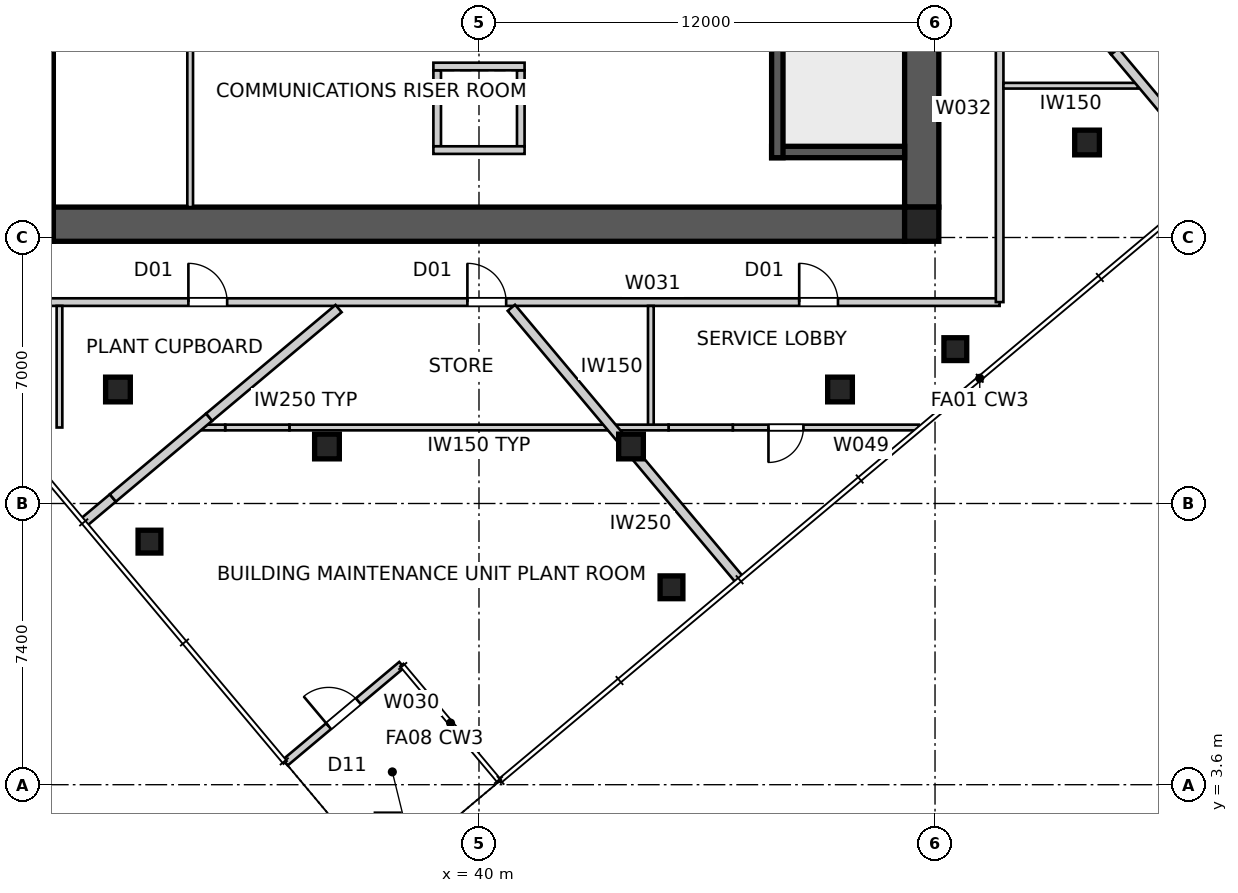
"""IFC4 building model, lengths in metres.
Left out: names, types, materials, properties, quantities, classifications, styles, units other than length and angle.
Written with IfcOpenShell. Run it as: python <this file> out.ifc"""

import sys

from ifc_helpers import new_model, si_unit, direction, frame, frame_2d, origin, origin_2d, place, context, subcontext, project, spatial, polyline, rectangle, outline, extrude, element, fill, save


model = new_model("IFC4")
c1 = context("Model", 3, precision=1e-05, world=origin(), true_north=direction((0.0, 1.0)))
c2 = subcontext(c1, "Body", "Model", "MODEL_VIEW")
j1 = project(units=[si_unit("LENGTHUNIT", "METRE"), si_unit("PLANEANGLEUNIT", "RADIAN")], contexts=[c1])
p1 = place(None, origin())
s1 = spatial("IfcSite", under=j1, at=p1, CompositionType="ELEMENT")
p2 = place(p1, origin())
s2 = spatial("IfcBuilding", under=s1, at=p2, CompositionType="ELEMENT")
p3 = place(p2, frame((0.0, 0.0, 304.3)))
s3 = spatial("IfcBuildingStorey", under=s2, at=p3, CompositionType="ELEMENT", Elevation=304.3)
p4 = place(p3, frame((51.2, 18.35, 0.0), z_axis=(0.0, 0.0, 1.0), x_axis=(-1.0, 0.0, 0.0)))
e1 = element("IfcWall", 1, at=p4, inside=s3, PredefinedType="SHEAR", context=c2, shape_type="SweptSolid", body=[
    extrude(outline(polyline([(0.0, -0.45), (22.4, -0.45), (22.4, -0.025), (22.85, -0.025), (22.85, 0.025), (22.4, 0.025), (22.4, 0.45), (0.0, 0.45), (0.0, 0.025), (-0.45, 0.025), (-0.45, -0.025), (0.0, -0.025), (0.0, -0.45)])), origin(), (0.0, 0.0, 1.0), 4.5),
])
p5 = place(p3, frame((51.65, 18.8, 0.0), z_axis=(0.0, 0.0, 1.0), x_axis=(0.0, 1.0, 0.0)))
e2 = element("IfcWall", 2, at=p5, inside=s3, PredefinedType="SHEAR", context=c2, shape_type="SweptSolid", body=[
    extrude(outline(polyline([(0.0, -0.45), (22.4, -0.45), (22.4, -0.025), (22.85, -0.025), (22.85, 0.025), (22.4, 0.025), (22.4, 0.45), (0.0, 0.45), (0.0, 0.025), (-0.45, 0.025), (-0.45, -0.025), (0.0, -0.025), (0.0, -0.45)])), origin(), (0.0, 0.0, 1.0), 4.5),
])
p6 = place(p5, frame((11.14, 0.0, 0.0)))
e3 = element("IfcOpeningElement", 3, at=p6, cuts=e2, PredefinedType="OPENING", context=c2, shape_type="SweptSolid", body=[
    extrude(rectangle(XDim=1.02, YDim=2.4, at=frame_2d((0.51, 1.2))), frame((0.0, 0.46, 0.0), z_axis=(0.0, -1.0, 0.0), x_axis=(1.0, 0.0, 0.0)), (0.0, 0.0, 1.0), 0.92),
])
p7 = place(p3, frame((28.35, 41.2, 0.0), z_axis=(0.0, 0.0, 1.0), x_axis=(0.0, -1.0, 0.0)))
e4 = element("IfcWall", 4, at=p7, inside=s3, PredefinedType="SHEAR", context=c2, shape_type="SweptSolid", body=[
    extrude(outline(polyline([(0.0, -0.45), (22.4, -0.45), (22.4, -0.025), (22.85, -0.025), (22.85, 0.025), (22.4, 0.025), (22.4, 0.45), (0.0, 0.45), (0.0, 0.025), (-0.45, 0.025), (-0.45, -0.025), (0.0, -0.025), (0.0, -0.45)])), origin(), (0.0, 0.0, 1.0), 4.5),
])
p8 = place(p7, frame((11.14, 0.0, 0.0)))
e5 = element("IfcOpeningElement", 5, at=p8, cuts=e4, PredefinedType="OPENING", context=c2, shape_type="SweptSolid", body=[
    extrude(rectangle(XDim=1.02, YDim=2.4, at=frame_2d((0.51, 1.2))), frame((0.0, 0.46, 0.0), z_axis=(0.0, -1.0, 0.0), x_axis=(1.0, 0.0, 0.0)), (0.0, 0.0, 1.0), 0.92),
])
p9 = place(p3, frame((47.85, 27.8, 0.0), z_axis=(0.0, 0.0, 1.0), x_axis=(0.0, -1.0, 0.0)))
e6 = element("IfcWall", 6, at=p9, inside=s3, PredefinedType="SHEAR", context=c2, shape_type="SweptSolid", body=[
    extrude(rectangle(XDim=7.7, YDim=0.3, at=frame_2d((3.85, 0.0))), origin(), (0.0, 0.0, 1.0), 4.5),
])
p10 = place(p3, frame((51.2, 20.25, 0.0), z_axis=(0.0, 0.0, 1.0), x_axis=(-1.0, 0.0, 0.0)))
e7 = element("IfcWall", 7, at=p10, inside=s3, PredefinedType="SHEAR", context=c2, shape_type="SweptSolid", body=[
    extrude(rectangle(XDim=3.5, YDim=0.3, at=frame_2d((1.75, 0.0))), origin(), (0.0, 0.0, 1.0), 4.5),
])
for number, where, z_axis, x_axis in (
    (8, (38.9, 22.4, 0.0), (0.0, 0.0, 1.0), (0.0, -1.0, 0.0)),
    (9, (41.1, 22.4, 0.0), (0.0, 0.0, 1.0), (0.0, -1.0, 0.0)),
):
    element("IfcWall", number, at=place(p3, frame(where, z_axis=z_axis, x_axis=x_axis)), inside=s3, PredefinedType="SOLIDWALL", context=c2, shape_type="SweptSolid", body=[
        extrude(rectangle(XDim=2.0, YDim=0.2, at=frame_2d((1.0, 0.0))), origin(), (0.0, 0.0, 1.0), 4.5),
    ])
for number, where, z_axis, x_axis in (
    (10, (38.8, 22.5, 0.0), (0.0, 0.0, 1.0), (1.0, 0.0, 0.0)),
    (11, (38.8, 20.3, 0.0), (0.0, 0.0, 1.0), (1.0, 0.0, 0.0)),
):
    element("IfcWall", number, at=place(p3, frame(where, z_axis=z_axis, x_axis=x_axis)), inside=s3, PredefinedType="SOLIDWALL", context=c2, shape_type="SweptSolid", body=[
        extrude(rectangle(XDim=2.4, YDim=0.2, at=frame_2d((1.2, 0.0))), origin(), (0.0, 0.0, 1.0), 4.5),
    ])
for number, where, z_axis, x_axis in (
    (12, (28.35, 18.35, 0.0), (0.0, 0.0, 1.0), (1.0, 0.0, 0.0)),
    (13, (51.65, 18.35, 0.0), (0.0, 0.0, 1.0), (1.0, 0.0, 0.0)),
):
    element("IfcColumn", number, at=place(p3, frame(where, z_axis=z_axis, x_axis=x_axis)), inside=s3, PredefinedType="COLUMN", context=c2, shape_type="SweptSolid", body=[
        extrude(rectangle(XDim=0.9, YDim=0.9, at=origin_2d()), origin(), (0.0, 0.0, 1.0), 4.5),
    ])
for number, where, z_axis, x_axis in (
    (14, (45.065, 8.795, 0.0), (0.0, 0.0, 1.0), (1.0, 0.0, 0.0)),
    (15, (52.534, 15.062, 0.0), (0.0, 0.0, 1.0), (1.0, 0.0, 0.0)),
    (16, (31.329, 9.997, 0.0), (0.0, 0.0, 1.0), (1.0, 0.0, 0.0)),
):
    element("IfcColumn", number, at=place(p3, frame(where, z_axis=z_axis, x_axis=x_axis)), inside=s3, PredefinedType="COLUMN", context=c2, shape_type="SweptSolid", body=[
        extrude(rectangle(XDim=0.6, YDim=0.6, at=origin_2d()), origin(), (0.0, 0.0, 1.0), 4.5),
    ])
for number, where, z_axis, x_axis in (
    (17, (30.5, 14.0, 0.0), (0.0, 0.0, 1.0), (1.0, 0.0, 0.0)),
    (18, (36.0, 12.5, 0.0), (0.0, 0.0, 1.0), (1.0, 0.0, 0.0)),
    (19, (44.0, 12.5, 0.0), (0.0, 0.0, 1.0), (1.0, 0.0, 0.0)),
    (20, (49.5, 14.0, 0.0), (0.0, 0.0, 1.0), (1.0, 0.0, 0.0)),
    (21, (56.0, 20.5, 0.0), (0.0, 0.0, 1.0), (1.0, 0.0, 0.0)),
):
    element("IfcColumn", number, at=place(p3, frame(where, z_axis=z_axis, x_axis=x_axis)), inside=s3, PredefinedType="COLUMN", context=c2, shape_type="SweptSolid", body=[
        extrude(rectangle(XDim=0.65, YDim=0.65, at=origin_2d()), origin(), (0.0, 0.0, 1.0), 4.5),
    ])
p11 = place(p3, frame((34.902, 4.183, 0.0), z_axis=(0.0, 0.0, 1.0), x_axis=(0.766060656284, 0.642768287094, 0.0)))
e22 = element("IfcWall", 22, at=p11, inside=s3, PredefinedType="SOLIDWALL", context=c2, shape_type="SweptSolid", body=[
    extrude(rectangle(XDim=4.0, YDim=0.2, at=frame_2d((2.0, 0.0))), origin(), (0.0, 0.0, 1.0), 4.25),
])
p12 = place(p11, frame((1.49, 0.0, 0.0)))
e23 = element("IfcOpeningElement", 23, at=p12, cuts=e22, PredefinedType="OPENING", context=c2, shape_type="SweptSolid", body=[
    extrude(rectangle(XDim=1.02, YDim=2.1, at=frame_2d((0.51, 1.05))), frame((0.0, 0.11, 0.0), z_axis=(0.0, -1.0, 0.0), x_axis=(1.0, 0.0, 0.0)), (0.0, 0.0, 1.0), 0.22),
])
p13 = place(p3, frame((26.3, 16.3, 0.0), z_axis=(0.0, 0.0, 1.0), x_axis=(1.0, 0.0, 0.0)))
e24 = element("IfcWall", 24, at=p13, inside=s3, PredefinedType="PARTITIONING", context=c2, shape_type="SweptSolid", body=[
    extrude(rectangle(XDim=27.4, YDim=0.2, at=frame_2d((13.7, 0.0))), origin(), (0.0, 0.0, 1.0), 4.25),
])
p14 = place(p13, frame((22.126, 0.0, 0.0)))
e25 = element("IfcOpeningElement", 25, at=p14, cuts=e24, PredefinedType="OPENING", context=c2, shape_type="SweptSolid", body=[
    extrude(rectangle(XDim=1.02, YDim=2.34, at=frame_2d((0.51, 1.17))), frame((0.0, 0.11, 0.0), z_axis=(0.0, -1.0, 0.0), x_axis=(1.0, 0.0, 0.0)), (0.0, 0.0, 1.0), 0.22),
])
p15 = place(p13, frame((13.395, 0.0, 0.0)))
e26 = element("IfcOpeningElement", 26, at=p15, cuts=e24, PredefinedType="OPENING", context=c2, shape_type="SweptSolid", body=[
    extrude(rectangle(XDim=1.02, YDim=2.34, at=frame_2d((0.51, 1.17))), frame((0.0, 0.11, 0.0), z_axis=(0.0, -1.0, 0.0), x_axis=(1.0, 0.0, 0.0)), (0.0, 0.0, 1.0), 0.22),
])
p16 = place(p13, frame((6.053, 0.0, 0.0)))
e27 = element("IfcOpeningElement", 27, at=p16, cuts=e24, PredefinedType="OPENING", context=c2, shape_type="SweptSolid", body=[
    extrude(rectangle(XDim=1.02, YDim=2.34, at=frame_2d((0.51, 1.17))), frame((0.0, 0.11, 0.0), z_axis=(0.0, -1.0, 0.0), x_axis=(1.0, 0.0, 0.0)), (0.0, 0.0, 1.0), 0.22),
])
p17 = place(p3, frame((53.7, 16.3, 0.0), z_axis=(0.0, 0.0, 1.0), x_axis=(0.0, 1.0, 0.0)))
e28 = element("IfcWall", 28, at=p17, inside=s3, PredefinedType="PARTITIONING", context=c2, shape_type="SweptSolid", body=[
    extrude(rectangle(XDim=27.4, YDim=0.2, at=frame_2d((13.7, 0.0))), origin(), (0.0, 0.0, 1.0), 4.25),
])
p18 = place(p17, frame((10.146, 0.0, 0.0)))
e29 = element("IfcOpeningElement", 29, at=p18, cuts=e28, PredefinedType="OPENING", context=c2, shape_type="SweptSolid", body=[
    extrude(rectangle(XDim=1.02, YDim=2.34, at=frame_2d((0.51, 1.17))), frame((0.0, 0.11, 0.0), z_axis=(0.0, -1.0, 0.0), x_axis=(1.0, 0.0, 0.0)), (0.0, 0.0, 1.0), 0.22),
])
p19 = place(p17, frame((17.042, 0.0, 0.0)))
e30 = element("IfcOpeningElement", 30, at=p19, cuts=e28, PredefinedType="OPENING", context=c2, shape_type="SweptSolid", body=[
    extrude(rectangle(XDim=1.02, YDim=2.34, at=frame_2d((0.51, 1.17))), frame((0.0, 0.11, 0.0), z_axis=(0.0, -1.0, 0.0), x_axis=(1.0, 0.0, 0.0)), (0.0, 0.0, 1.0), 0.22),
])
p20 = place(p17, frame((23.434, 0.0, 0.0)))
e31 = element("IfcOpeningElement", 31, at=p20, cuts=e28, PredefinedType="OPENING", context=c2, shape_type="SweptSolid", body=[
    extrude(rectangle(XDim=1.02, YDim=2.34, at=frame_2d((0.51, 1.17))), frame((0.0, 0.11, 0.0), z_axis=(0.0, -1.0, 0.0), x_axis=(1.0, 0.0, 0.0)), (0.0, 0.0, 1.0), 0.22),
])
p21 = place(p3, frame((46.857, 8.993, 0.0), z_axis=(0.0, 0.0, 1.0), x_axis=(-0.64278692291, 0.766045019392, 0.0)))
e32 = element("IfcWall", 32, at=p21, inside=s3, PredefinedType="PARTITIONING", context=c2, shape_type="SweptSolid", body=[
    extrude(rectangle(XDim=9.343, YDim=0.25, at=frame_2d((4.671, 0.0))), origin(), (0.0, 0.0, 1.0), 4.25),
])
p22 = place(p3, frame((58.854, 20.365, 0.0), z_axis=(0.0, 0.0, 1.0), x_axis=(-0.642823301165, 0.766014492995, 0.0)))
e33 = element("IfcWall", 33, at=p22, inside=s3, PredefinedType="PARTITIONING", context=c2, shape_type="SweptSolid", body=[
    extrude(rectangle(XDim=3.308, YDim=0.25, at=frame_2d((1.654, 0.0))), origin(), (0.0, 0.0, 1.0), 3.638),
])
p23 = place(p3, frame((56.728, 22.899, 0.0), z_axis=(0.0, 0.0, 1.0), x_axis=(-0.642778620996, 0.766051985436, 0.0)))
e34 = element("IfcWall", 34, at=p23, inside=s3, PredefinedType="PARTITIONING", context=c2, shape_type="SweptSolid", body=[
    extrude(rectangle(XDim=4.446, YDim=0.25, at=frame_2d((2.223, 0.0))), origin(), (0.0, 0.0, 1.0), 4.25),
])
p24 = place(p3, frame((29.599, 10.503, 0.0), z_axis=(0.0, 0.0, 1.0), x_axis=(0.766055819685, 0.64277405138, 0.0)))
e35 = element("IfcWall", 35, at=p24, inside=s3, PredefinedType="PARTITIONING", context=c2, shape_type="SweptSolid", body=[
    extrude(rectangle(XDim=1.0, YDim=0.25, at=frame_2d((0.5, 0.0))), origin(), (0.0, 0.0, 1.0), 4.25),
])
p25 = place(p3, frame((30.365, 11.146, 0.0), z_axis=(0.0, 0.0, 1.0), x_axis=(0.766014492995, 0.642823301165, 0.0)))
e36 = element("IfcWall", 36, at=p25, inside=s3, PredefinedType="PARTITIONING", context=c2, shape_type="SweptSolid", body=[
    extrude(rectangle(XDim=3.308, YDim=0.25, at=frame_2d((1.654, 0.0))), origin(), (0.0, 0.0, 1.0), 3.638),
])
p26 = place(p3, frame((32.899, 13.272, 0.0), z_axis=(0.0, 0.0, 1.0), x_axis=(0.766051985436, 0.642778620996, 0.0)))
e37 = element("IfcWall", 37, at=p26, inside=s3, PredefinedType="PARTITIONING", context=c2, shape_type="SweptSolid", body=[
    extrude(rectangle(XDim=4.446, YDim=0.25, at=frame_2d((2.223, 0.0))), origin(), (0.0, 0.0, 1.0), 4.25),
])
p27 = place(p3, frame((32.4, 18.8, 0.0), z_axis=(0.0, 0.0, 1.0), x_axis=(0.0, 1.0, 0.0)))
e38 = element("IfcWall", 38, at=p27, inside=s3, PredefinedType="SOLIDWALL", context=c2, shape_type="SweptSolid", body=[
    extrude(rectangle(XDim=5.9, YDim=0.15, at=frame_2d((2.95, 0.0))), origin(), (0.0, 0.0, 1.0), 4.25),
])
p28 = place(p3, frame((28.961, 16.2, 0.0), z_axis=(0.0, 0.0, 1.0), x_axis=(0.0, -1.0, 0.0)))
e39 = element("IfcWall", 39, at=p28, inside=s3, PredefinedType="SOLIDWALL", context=c2, shape_type="SweptSolid", body=[
    extrude(rectangle(XDim=3.2, YDim=0.15, at=frame_2d((1.6, 0.0))), origin(), (0.0, 0.0, 1.0), 4.25),
])
p29 = place(p3, frame((53.8, 21.994, 0.0), z_axis=(0.0, 0.0, 1.0), x_axis=(1.0, 0.0, 0.0)))
e40 = element("IfcWall", 40, at=p29, inside=s3, PredefinedType="SOLIDWALL", context=c2, shape_type="SweptSolid", body=[
    extrude(rectangle(XDim=3.544, YDim=0.15, at=frame_2d((1.772, 0.0))), origin(), (0.0, 0.0, 1.0), 4.25),
])
p30 = place(p3, frame((44.522, 13.0, 0.0), z_axis=(0.0, 0.0, 1.0), x_axis=(0.0, 1.0, 0.0)))
e41 = element("IfcWall", 41, at=p30, inside=s3, PredefinedType="SOLIDWALL", context=c2, shape_type="SweptSolid", body=[
    extrude(rectangle(XDim=3.2, YDim=0.15, at=frame_2d((1.6, 0.0))), origin(), (0.0, 0.0, 1.0), 4.25),
])
p31 = place(p3, frame((51.57, 13.0, 0.0), z_axis=(0.0, 0.0, 1.0), x_axis=(-1.0, 0.0, 0.0)))
e42 = element("IfcWall", 42, at=p31, inside=s3, PredefinedType="SOLIDWALL", context=c2, shape_type="SweptSolid", body=[
    extrude(rectangle(XDim=4.892, YDim=0.15, at=frame_2d((2.446, 0.0))), origin(), (0.0, 0.0, 1.0), 4.25),
])
p32 = place(p31, frame((3.033, 0.0, 0.0)))
e43 = element("IfcOpeningElement", 43, at=p32, cuts=e42, PredefinedType="OPENING", context=c2, shape_type="SweptSolid", body=[
    extrude(rectangle(XDim=0.92, YDim=2.1, at=frame_2d((0.46, 1.05))), frame((0.0, 0.085, 0.0), z_axis=(0.0, -1.0, 0.0), x_axis=(1.0, 0.0, 0.0)), (0.0, 0.0, 1.0), 0.17),
])
p33 = place(p3, frame((46.678, 13.0, 0.0), z_axis=(0.0, 0.0, 1.0), x_axis=(-1.0, 0.0, 0.0)))
e44 = element("IfcWall", 44, at=p33, inside=s3, PredefinedType="SOLIDWALL", context=c2, shape_type="SweptSolid", body=[
    extrude(rectangle(XDim=1.69, YDim=0.15, at=frame_2d((0.845, 0.0))), origin(), (0.0, 0.0, 1.0), 3.25),
])
p34 = place(p3, frame((44.988, 13.0, 0.0), z_axis=(0.0, 0.0, 1.0), x_axis=(-1.0, 0.0, 0.0)))
e45 = element("IfcWall", 45, at=p34, inside=s3, PredefinedType="SOLIDWALL", context=c2, shape_type="SweptSolid", body=[
    extrude(rectangle(XDim=9.977, YDim=0.15, at=frame_2d((4.988, 0.0))), origin(), (0.0, 0.0, 1.0), 4.25),
])
p35 = place(p3, frame((35.012, 13.0, 0.0), z_axis=(0.0, 0.0, 1.0), x_axis=(-1.0, 0.0, 0.0)))
e46 = element("IfcWall", 46, at=p35, inside=s3, PredefinedType="SOLIDWALL", context=c2, shape_type="SweptSolid", body=[
    extrude(rectangle(XDim=1.69, YDim=0.15, at=frame_2d((0.845, 0.0))), origin(), (0.0, 0.0, 1.0), 3.25),
])
p36 = place(p3, frame((33.322, 13.0, 0.0), z_axis=(0.0, 0.0, 1.0), x_axis=(-1.0, 0.0, 0.0)))
e47 = element("IfcWall", 47, at=p36, inside=s3, PredefinedType="SOLIDWALL", context=c2, shape_type="SweptSolid", body=[
    extrude(rectangle(XDim=0.747, YDim=0.15, at=frame_2d((0.373, 0.0))), origin(), (0.0, 0.0, 1.0), 4.25),
])
p37 = place(p12, origin())
e48 = element("IfcDoor", 48, at=p37, inside=s3, OperationType="SINGLE_SWING_LEFT", PredefinedType="DOOR", context=c2, shape_type="SweptSolid", body=[
    extrude(rectangle(XDim=1.02, YDim=2.1, at=frame_2d((0.51, 1.05))), frame((0.0, 0.025, 0.0), z_axis=(0.0, -1.0, 0.0), x_axis=(1.0, 0.0, 0.0)), (0.0, 0.0, 1.0), 0.05),
])
fill(e23, e48)
p38 = place(p14, origin())
e49 = element("IfcDoor", 49, at=p38, inside=s3, OperationType="SINGLE_SWING_LEFT", PredefinedType="DOOR", context=c2, shape_type="SweptSolid", body=[
    extrude(rectangle(XDim=1.02, YDim=2.34, at=frame_2d((0.51, 1.17))), frame((0.0, 0.025, 0.0), z_axis=(0.0, -1.0, 0.0), x_axis=(1.0, 0.0, 0.0)), (0.0, 0.0, 1.0), 0.05),
])
fill(e25, e49)
p39 = place(p15, origin())
e50 = element("IfcDoor", 50, at=p39, inside=s3, OperationType="SINGLE_SWING_LEFT", PredefinedType="DOOR", context=c2, shape_type="SweptSolid", body=[
    extrude(rectangle(XDim=1.02, YDim=2.34, at=frame_2d((0.51, 1.17))), frame((0.0, 0.025, 0.0), z_axis=(0.0, -1.0, 0.0), x_axis=(1.0, 0.0, 0.0)), (0.0, 0.0, 1.0), 0.05),
])
fill(e26, e50)
p40 = place(p16, origin())
e51 = element("IfcDoor", 51, at=p40, inside=s3, OperationType="SINGLE_SWING_LEFT", PredefinedType="DOOR", context=c2, shape_type="SweptSolid", body=[
    extrude(rectangle(XDim=1.02, YDim=2.34, at=frame_2d((0.51, 1.17))), frame((0.0, 0.025, 0.0), z_axis=(0.0, -1.0, 0.0), x_axis=(1.0, 0.0, 0.0)), (0.0, 0.0, 1.0), 0.05),
])
fill(e27, e51)
p41 = place(p32, origin())
e52 = element("IfcDoor", 52, at=p41, inside=s3, OperationType="SINGLE_SWING_RIGHT", PredefinedType="DOOR", context=c2, shape_type="SweptSolid", body=[
    extrude(rectangle(XDim=0.92, YDim=2.1, at=frame_2d((0.46, 1.05))), frame((0.0, 0.025, 0.0), z_axis=(0.0, -1.0, 0.0), x_axis=(1.0, 0.0, 0.0)), (0.0, 0.0, 1.0), 0.05),
])
fill(e43, e52)
save(model, sys.argv[1])
